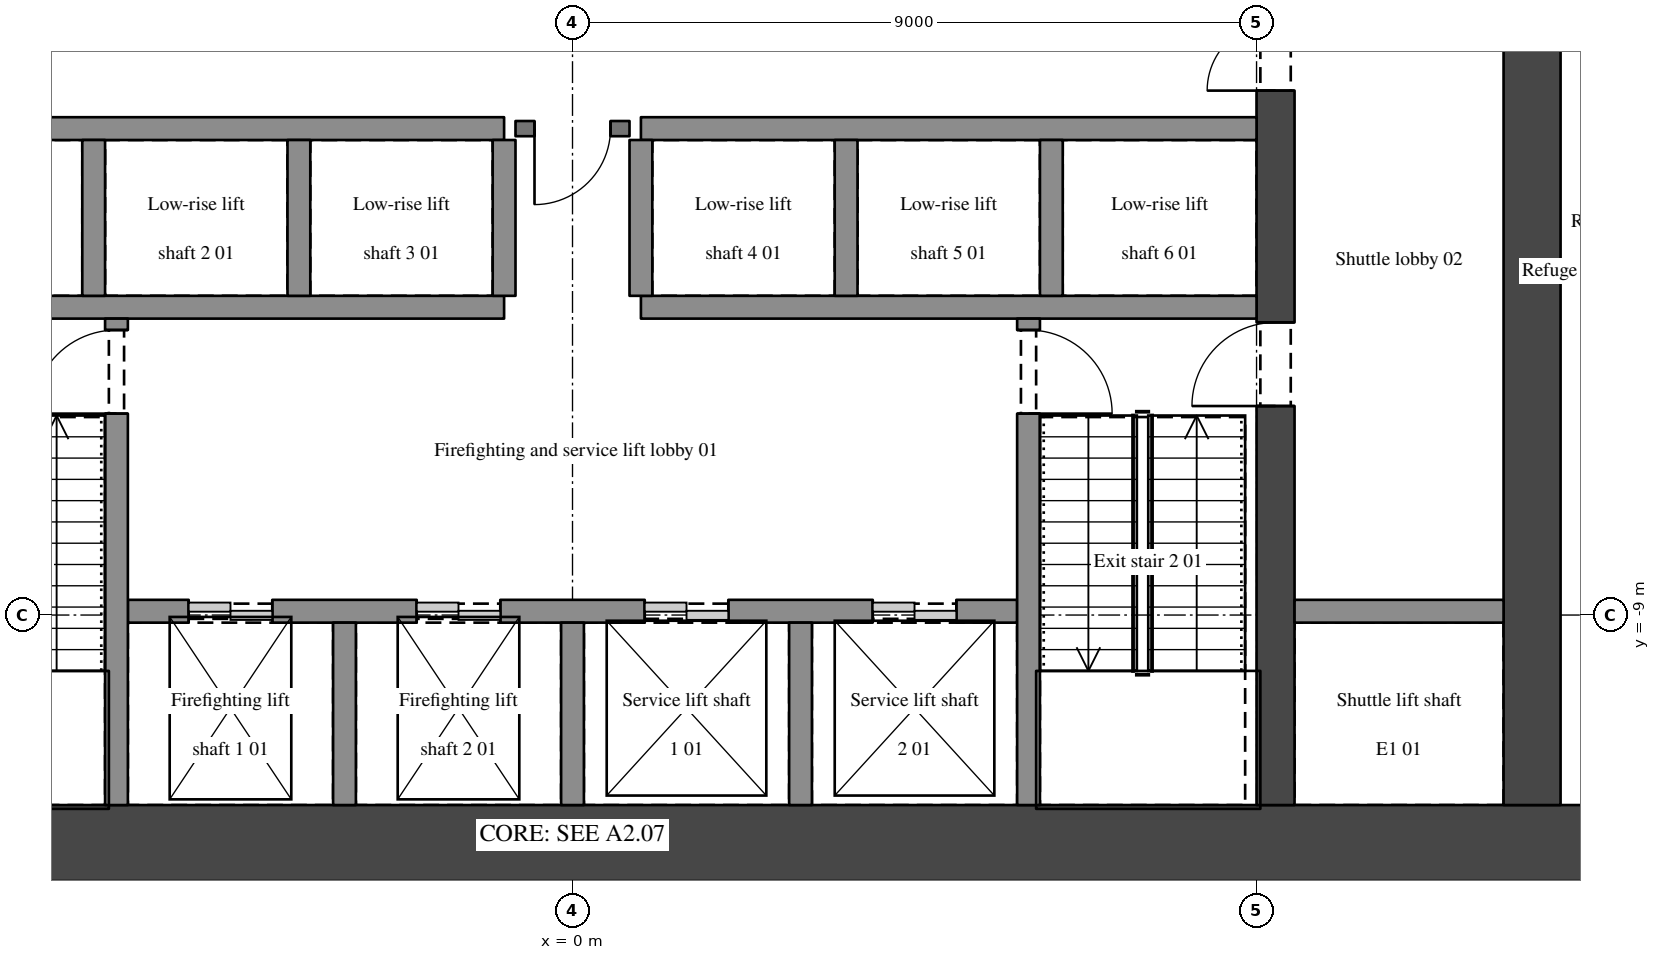
"""IFC4 building model, lengths in metres.
Left out: names, types, materials, properties, quantities, classifications, styles, units other than length and angle.
Written with IfcOpenShell. Run it as: python <this file> out.ifc"""

import sys

from ifc_helpers import new_model, si_unit, direction, frame, frame_2d, origin, place, context, subcontext, project, spatial, rectangle, extrude, element, fill, save


model = new_model("IFC4")
c1 = context("Model", 3, precision=1e-05, world=origin(), true_north=direction((0.0, 1.0)))
c2 = subcontext(c1, "Body", "Model", "MODEL_VIEW")
j1 = project(units=[si_unit("LENGTHUNIT", "METRE"), si_unit("PLANEANGLEUNIT", "RADIAN")], contexts=[c1])
p1 = place(None, origin())
s1 = spatial("IfcSite", under=j1, at=p1, CompositionType="ELEMENT")
p2 = place(p1, origin())
s2 = spatial("IfcBuilding", under=s1, at=p2, CompositionType="ELEMENT")
p3 = place(p2, frame((0.0, 0.0, 57.6)))
s3 = spatial("IfcBuildingStorey", under=s2, at=p3, CompositionType="ELEMENT", Elevation=57.6)
p4 = place(p3, frame((-15.0, -12.0, 0.0), z_axis=(0.0, 0.0, 1.0), x_axis=(1.0, 0.0, 0.0)))
e1 = element("IfcWall", 1, at=p4, inside=s3, PredefinedType="SHEAR", context=c2, shape_type="SweptSolid", body=[
    extrude(rectangle(XDim=30.0, YDim=1.0, at=frame_2d((15.0, 0.0))), origin(), (0.0, 0.0, 1.0), 4.5),
])
p5 = place(p3, frame((12.625, -11.5, 0.0), z_axis=(0.0, 0.0, 1.0), x_axis=(0.0, 1.0, 0.0)))
e2 = element("IfcWall", 2, at=p5, inside=s3, PredefinedType="SHEAR", context=c2, shape_type="SweptSolid", body=[
    extrude(rectangle(XDim=14.65, YDim=0.75, at=frame_2d((7.325, 0.0))), origin(), (0.0, 0.0, 1.0), 4.5),
])
p6 = place(p5, frame((10.05, 0.0, 0.0)))
e3 = element("IfcOpeningElement", 3, at=p6, cuts=e2, PredefinedType="OPENING", context=c2, shape_type="SweptSolid", body=[
    extrude(rectangle(XDim=0.9, YDim=2.1, at=frame_2d((0.45, 1.05))), frame((0.0, 0.385, 0.0), z_axis=(0.0, -1.0, 0.0), x_axis=(1.0, 0.0, 0.0)), (0.0, 0.0, 1.0), 0.77),
])
p7 = place(p3, frame((9.25, -11.5, 0.0), z_axis=(0.0, 0.0, 1.0), x_axis=(0.0, 1.0, 0.0)))
e4 = element("IfcWall", 4, at=p7, inside=s3, PredefinedType="SHEAR", context=c2, shape_type="SweptSolid", body=[
    extrude(rectangle(XDim=11.65, YDim=0.5, at=frame_2d((5.825, 0.0))), origin(), (0.0, 0.0, 1.0), 4.5),
])
p8 = place(p7, frame((9.4, 0.0, 0.0)))
e5 = element("IfcOpeningElement", 5, at=p8, cuts=e4, PredefinedType="OPENING", context=c2, shape_type="SweptSolid", body=[
    extrude(rectangle(XDim=1.8, YDim=2.1, at=frame_2d((0.9, 1.05))), frame((0.0, 0.26, 0.0), z_axis=(0.0, -1.0, 0.0), x_axis=(1.0, 0.0, 0.0)), (0.0, 0.0, 1.0), 0.52),
])
p9 = place(p7, frame((5.25, 0.0, 0.0)))
e6 = element("IfcOpeningElement", 6, at=p9, cuts=e4, PredefinedType="OPENING", context=c2, shape_type="SweptSolid", body=[
    extrude(rectangle(XDim=1.1, YDim=2.1, at=frame_2d((0.55, 1.05))), frame((0.0, 0.26, 0.0), z_axis=(0.0, -1.0, 0.0), x_axis=(1.0, 0.0, 0.0)), (0.0, 0.0, 1.0), 0.52),
])
p10 = place(p3, frame((-5.85, -8.95, 0.0), z_axis=(0.0, 0.0, 1.0), x_axis=(1.0, 0.0, 0.0)))
e7 = element("IfcWall", 7, at=p10, inside=s3, PredefinedType="SHEAR", context=c2, shape_type="SweptSolid", body=[
    extrude(rectangle(XDim=11.7, YDim=0.3, at=frame_2d((5.85, 0.0))), origin(), (0.0, 0.0, 1.0), 4.5),
])
p11 = place(p10, frame((0.8, 0.0, 0.0)))
e8 = element("IfcOpeningElement", 8, at=p11, cuts=e7, PredefinedType="OPENING", context=c2, shape_type="SweptSolid", body=[
    extrude(rectangle(XDim=1.1, YDim=2.1, at=frame_2d((0.55, 1.05))), frame((0.0, 0.16, 0.0), z_axis=(0.0, -1.0, 0.0), x_axis=(1.0, 0.0, 0.0)), (0.0, 0.0, 1.0), 0.32),
])
p12 = place(p10, frame((3.8, 0.0, 0.0)))
e9 = element("IfcOpeningElement", 9, at=p12, cuts=e7, PredefinedType="OPENING", context=c2, shape_type="SweptSolid", body=[
    extrude(rectangle(XDim=1.1, YDim=2.1, at=frame_2d((0.55, 1.05))), frame((0.0, 0.16, 0.0), z_axis=(0.0, -1.0, 0.0), x_axis=(1.0, 0.0, 0.0)), (0.0, 0.0, 1.0), 0.32),
])
p13 = place(p10, frame((6.8, 0.0, 0.0)))
e10 = element("IfcOpeningElement", 10, at=p13, cuts=e7, PredefinedType="OPENING", context=c2, shape_type="SweptSolid", body=[
    extrude(rectangle(XDim=1.1, YDim=2.1, at=frame_2d((0.55, 1.05))), frame((0.0, 0.16, 0.0), z_axis=(0.0, -1.0, 0.0), x_axis=(1.0, 0.0, 0.0)), (0.0, 0.0, 1.0), 0.32),
])
p14 = place(p10, frame((9.8, 0.0, 0.0)))
e11 = element("IfcOpeningElement", 11, at=p14, cuts=e7, PredefinedType="OPENING", context=c2, shape_type="SweptSolid", body=[
    extrude(rectangle(XDim=1.1, YDim=2.1, at=frame_2d((0.55, 1.05))), frame((0.0, 0.16, 0.0), z_axis=(0.0, -1.0, 0.0), x_axis=(1.0, 0.0, 0.0)), (0.0, 0.0, 1.0), 0.32),
])
p15 = place(p3, frame((9.5, -8.95, 0.0), z_axis=(0.0, 0.0, 1.0), x_axis=(1.0, 0.0, 0.0)))
e12 = element("IfcWall", 12, at=p15, inside=s3, PredefinedType="SHEAR", context=c2, shape_type="SweptSolid", body=[
    extrude(rectangle(XDim=2.75, YDim=0.3, at=frame_2d((1.375, 0.0))), origin(), (0.0, 0.0, 1.0), 4.5),
])
for number, where, z_axis, x_axis in (
    (13, (-9.0, -4.95, 0.0), (0.0, 0.0, 1.0), (1.0, 0.0, 0.0)),
    (14, (0.9, -4.95, 0.0), (0.0, 0.0, 1.0), (1.0, 0.0, 0.0)),
    (15, (-9.0, -2.6, 0.0), (0.0, 0.0, 1.0), (1.0, 0.0, 0.0)),
):
    element("IfcWall", number, at=place(p3, frame(where, z_axis=z_axis, x_axis=x_axis)), inside=s3, PredefinedType="SHEAR", context=c2, shape_type="SweptSolid", body=[
        extrude(rectangle(XDim=8.1, YDim=0.3, at=frame_2d((4.05, 0.0))), origin(), (0.0, 0.0, 1.0), 4.5),
    ])
p16 = place(p3, frame((0.75, -2.6, 0.0), z_axis=(0.0, 0.0, 1.0), x_axis=(-1.0, 0.0, 0.0)))
e16 = element("IfcWall", 16, at=p16, inside=s3, PredefinedType="SOLIDWALL", context=c2, shape_type="SweptSolid", body=[
    extrude(rectangle(XDim=1.5, YDim=0.2, at=frame_2d((0.75, 0.0))), origin(), (0.0, 0.0, 1.0), 4.2),
])
p17 = place(p16, frame((0.25, 0.0, 0.0)))
e17 = element("IfcOpeningElement", 17, at=p17, cuts=e16, PredefinedType="OPENING", context=c2, shape_type="SweptSolid", body=[
    extrude(rectangle(XDim=1.0, YDim=2.1, at=frame_2d((0.5, 1.05))), frame((0.0, 0.11, 0.0), z_axis=(0.0, -1.0, 0.0), x_axis=(1.0, 0.0, 0.0)), (0.0, 0.0, 1.0), 0.22),
])
p18 = place(p3, frame((0.9, -2.6, 0.0), z_axis=(0.0, 0.0, 1.0), x_axis=(1.0, 0.0, 0.0)))
e18 = element("IfcWall", 18, at=p18, inside=s3, PredefinedType="SHEAR", context=c2, shape_type="SweptSolid", body=[
    extrude(rectangle(XDim=8.1, YDim=0.3, at=frame_2d((4.05, 0.0))), origin(), (0.0, 0.0, 1.0), 4.5),
])
p19 = place(p3, frame((-6.3, -4.8, 0.0), z_axis=(0.0, 0.0, 1.0), x_axis=(0.0, 1.0, 0.0)))
e19 = element("IfcWall", 19, at=p19, inside=s3, PredefinedType="SHEAR", context=c2, shape_type="SweptSolid", body=[
    extrude(rectangle(XDim=2.05, YDim=0.3, at=frame_2d((1.025, 0.0))), origin(), (0.0, 0.0, 1.0), 4.5),
])
p20 = place(p3, frame((-6.0, -11.5, 0.0), z_axis=(0.0, 0.0, 1.0), x_axis=(0.0, 1.0, 0.0)))
e20 = element("IfcWall", 20, at=p20, inside=s3, PredefinedType="SHEAR", context=c2, shape_type="SweptSolid", body=[
    extrude(rectangle(XDim=6.4, YDim=0.3, at=frame_2d((3.2, 0.0))), origin(), (0.0, 0.0, 1.0), 4.5),
])
p21 = place(p20, frame((5.15, 0.0, 0.0)))
e21 = element("IfcOpeningElement", 21, at=p21, cuts=e20, PredefinedType="OPENING", context=c2, shape_type="SweptSolid", body=[
    extrude(rectangle(XDim=1.1, YDim=2.1, at=frame_2d((0.55, 1.05))), frame((0.0, 0.16, 0.0), z_axis=(0.0, -1.0, 0.0), x_axis=(1.0, 0.0, 0.0)), (0.0, 0.0, 1.0), 0.32),
])
p22 = place(p3, frame((-3.6, -4.8, 0.0), z_axis=(0.0, 0.0, 1.0), x_axis=(0.0, 1.0, 0.0)))
e22 = element("IfcWall", 22, at=p22, inside=s3, PredefinedType="SHEAR", context=c2, shape_type="SweptSolid", body=[
    extrude(rectangle(XDim=2.05, YDim=0.3, at=frame_2d((1.025, 0.0))), origin(), (0.0, 0.0, 1.0), 4.5),
])
p23 = place(p3, frame((-3.0, -11.5, 0.0), z_axis=(0.0, 0.0, 1.0), x_axis=(0.0, 1.0, 0.0)))
e23 = element("IfcWall", 23, at=p23, inside=s3, PredefinedType="SHEAR", context=c2, shape_type="SweptSolid", body=[
    extrude(rectangle(XDim=2.4, YDim=0.3, at=frame_2d((1.2, 0.0))), origin(), (0.0, 0.0, 1.0), 4.5),
])
p24 = place(p3, frame((-0.9, -4.8, 0.0), z_axis=(0.0, 0.0, 1.0), x_axis=(0.0, 1.0, 0.0)))
e24 = element("IfcWall", 24, at=p24, inside=s3, PredefinedType="SHEAR", context=c2, shape_type="SweptSolid", body=[
    extrude(rectangle(XDim=2.05, YDim=0.3, at=frame_2d((1.025, 0.0))), origin(), (0.0, 0.0, 1.0), 4.5),
])
p25 = place(p3, frame((0.0, -11.5, 0.0), z_axis=(0.0, 0.0, 1.0), x_axis=(0.0, 1.0, 0.0)))
e25 = element("IfcWall", 25, at=p25, inside=s3, PredefinedType="SHEAR", context=c2, shape_type="SweptSolid", body=[
    extrude(rectangle(XDim=2.4, YDim=0.3, at=frame_2d((1.2, 0.0))), origin(), (0.0, 0.0, 1.0), 4.5),
])
p26 = place(p3, frame((0.9, -4.8, 0.0), z_axis=(0.0, 0.0, 1.0), x_axis=(0.0, 1.0, 0.0)))
e26 = element("IfcWall", 26, at=p26, inside=s3, PredefinedType="SHEAR", context=c2, shape_type="SweptSolid", body=[
    extrude(rectangle(XDim=2.05, YDim=0.3, at=frame_2d((1.025, 0.0))), origin(), (0.0, 0.0, 1.0), 4.5),
])
p27 = place(p3, frame((3.0, -11.5, 0.0), z_axis=(0.0, 0.0, 1.0), x_axis=(0.0, 1.0, 0.0)))
e27 = element("IfcWall", 27, at=p27, inside=s3, PredefinedType="SHEAR", context=c2, shape_type="SweptSolid", body=[
    extrude(rectangle(XDim=2.4, YDim=0.3, at=frame_2d((1.2, 0.0))), origin(), (0.0, 0.0, 1.0), 4.5),
])
p28 = place(p3, frame((3.6, -4.8, 0.0), z_axis=(0.0, 0.0, 1.0), x_axis=(0.0, 1.0, 0.0)))
e28 = element("IfcWall", 28, at=p28, inside=s3, PredefinedType="SHEAR", context=c2, shape_type="SweptSolid", body=[
    extrude(rectangle(XDim=2.05, YDim=0.3, at=frame_2d((1.025, 0.0))), origin(), (0.0, 0.0, 1.0), 4.5),
])
p29 = place(p3, frame((6.0, -5.1, 0.0), z_axis=(0.0, 0.0, 1.0), x_axis=(0.0, -1.0, 0.0)))
e29 = element("IfcWall", 29, at=p29, inside=s3, PredefinedType="SHEAR", context=c2, shape_type="SweptSolid", body=[
    extrude(rectangle(XDim=6.4, YDim=0.3, at=frame_2d((3.2, 0.0))), origin(), (0.0, 0.0, 1.0), 4.5),
])
p30 = place(p29, frame((0.15, 0.0, 0.0)))
e30 = element("IfcOpeningElement", 30, at=p30, cuts=e29, PredefinedType="OPENING", context=c2, shape_type="SweptSolid", body=[
    extrude(rectangle(XDim=1.1, YDim=2.1, at=frame_2d((0.55, 1.05))), frame((0.0, 0.16, 0.0), z_axis=(0.0, -1.0, 0.0), x_axis=(1.0, 0.0, 0.0)), (0.0, 0.0, 1.0), 0.32),
])
p31 = place(p3, frame((6.3, -4.8, 0.0), z_axis=(0.0, 0.0, 1.0), x_axis=(0.0, 1.0, 0.0)))
e31 = element("IfcWall", 31, at=p31, inside=s3, PredefinedType="SHEAR", context=c2, shape_type="SweptSolid", body=[
    extrude(rectangle(XDim=2.05, YDim=0.3, at=frame_2d((1.025, 0.0))), origin(), (0.0, 0.0, 1.0), 4.5),
])
p32 = place(p8, origin())
e32 = element("IfcDoor", 32, at=p32, inside=s3, OperationType="DOUBLE_DOOR_SINGLE_SWING", PredefinedType="DOOR", context=c2, shape_type="SweptSolid", body=[
    extrude(rectangle(XDim=1.8, YDim=2.1, at=frame_2d((0.9, 1.05))), frame((0.0, 0.025, 0.0), z_axis=(0.0, -1.0, 0.0), x_axis=(1.0, 0.0, 0.0)), (0.0, 0.0, 1.0), 0.05),
])
fill(e5, e32)
p33 = place(p17, origin())
e33 = element("IfcDoor", 33, at=p33, inside=s3, OperationType="SINGLE_SWING_RIGHT", PredefinedType="DOOR", context=c2, shape_type="SweptSolid", body=[
    extrude(rectangle(XDim=1.0, YDim=2.1, at=frame_2d((0.5, 1.05))), frame((0.0, 0.025, 0.0), z_axis=(0.0, -1.0, 0.0), x_axis=(1.0, 0.0, 0.0)), (0.0, 0.0, 1.0), 0.05),
])
fill(e17, e33)
p34 = place(p21, origin())
e34 = element("IfcDoor", 34, at=p34, inside=s3, OperationType="SINGLE_SWING_LEFT", PredefinedType="DOOR", context=c2, shape_type="SweptSolid", body=[
    extrude(rectangle(XDim=1.1, YDim=2.1, at=frame_2d((0.55, 1.05))), frame((0.0, 0.025, 0.0), z_axis=(0.0, -1.0, 0.0), x_axis=(1.0, 0.0, 0.0)), (0.0, 0.0, 1.0), 0.05),
])
fill(e21, e34)
p35 = place(p30, origin())
e35 = element("IfcDoor", 35, at=p35, inside=s3, OperationType="SINGLE_SWING_RIGHT", PredefinedType="DOOR", context=c2, shape_type="SweptSolid", body=[
    extrude(rectangle(XDim=1.1, YDim=2.1, at=frame_2d((0.55, 1.05))), frame((0.0, 0.025, 0.0), z_axis=(0.0, -1.0, 0.0), x_axis=(1.0, 0.0, 0.0)), (0.0, 0.0, 1.0), 0.05),
])
fill(e30, e35)
p36 = place(p9, origin())
e36 = element("IfcDoor", 36, at=p36, inside=s3, OperationType="SINGLE_SWING_LEFT", PredefinedType="DOOR", context=c2, shape_type="SweptSolid", body=[
    extrude(rectangle(XDim=1.1, YDim=2.1, at=frame_2d((0.55, 1.05))), frame((0.0, 0.025, 0.0), z_axis=(0.0, -1.0, 0.0), x_axis=(1.0, 0.0, 0.0)), (0.0, 0.0, 1.0), 0.05),
])
fill(e6, e36)
p37 = place(p11, origin())
e37 = element("IfcDoor", 37, at=p37, inside=s3, OperationType="DOUBLE_DOOR_SLIDING", PredefinedType="DOOR", context=c2, shape_type="SweptSolid", body=[
    extrude(rectangle(XDim=1.1, YDim=2.1, at=frame_2d((0.55, 1.05))), frame((0.0, 0.025, 0.0), z_axis=(0.0, -1.0, 0.0), x_axis=(1.0, 0.0, 0.0)), (0.0, 0.0, 1.0), 0.05),
])
fill(e8, e37)
p38 = place(p12, origin())
e38 = element("IfcDoor", 38, at=p38, inside=s3, OperationType="DOUBLE_DOOR_SLIDING", PredefinedType="DOOR", context=c2, shape_type="SweptSolid", body=[
    extrude(rectangle(XDim=1.1, YDim=2.1, at=frame_2d((0.55, 1.05))), frame((0.0, 0.025, 0.0), z_axis=(0.0, -1.0, 0.0), x_axis=(1.0, 0.0, 0.0)), (0.0, 0.0, 1.0), 0.05),
])
fill(e9, e38)
p39 = place(p13, origin())
e39 = element("IfcDoor", 39, at=p39, inside=s3, OperationType="DOUBLE_DOOR_SLIDING", PredefinedType="DOOR", context=c2, shape_type="SweptSolid", body=[
    extrude(rectangle(XDim=1.1, YDim=2.1, at=frame_2d((0.55, 1.05))), frame((0.0, 0.025, 0.0), z_axis=(0.0, -1.0, 0.0), x_axis=(1.0, 0.0, 0.0)), (0.0, 0.0, 1.0), 0.05),
])
fill(e10, e39)
p40 = place(p14, origin())
e40 = element("IfcDoor", 40, at=p40, inside=s3, OperationType="DOUBLE_DOOR_SLIDING", PredefinedType="DOOR", context=c2, shape_type="SweptSolid", body=[
    extrude(rectangle(XDim=1.1, YDim=2.1, at=frame_2d((0.55, 1.05))), frame((0.0, 0.025, 0.0), z_axis=(0.0, -1.0, 0.0), x_axis=(1.0, 0.0, 0.0)), (0.0, 0.0, 1.0), 0.05),
])
fill(e11, e40)
save(model, sys.argv[1])
